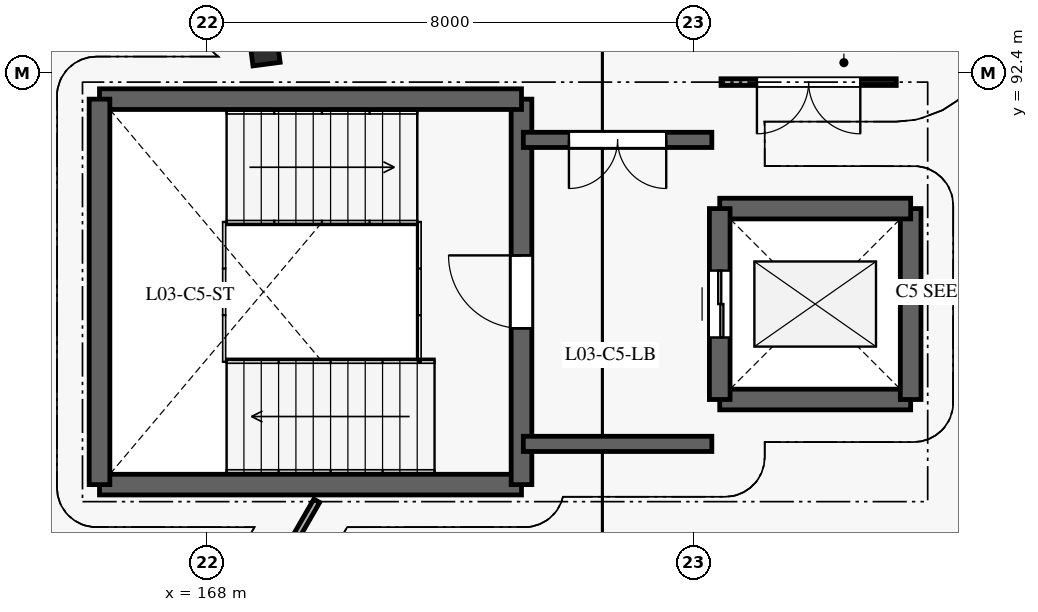
"""IFC4 building model, lengths in metres.
Left out: names, types, materials, properties, quantities, classifications, styles, units other than length and angle.
Written with IfcOpenShell. Run it as: python <this file> out.ifc"""

import sys

from ifc_helpers import new_model, si_unit, direction, frame, frame_2d, origin, origin_2d, place, context, subcontext, project, spatial, rectangle, extrude, element, fill, save


model = new_model("IFC4")
c1 = context("Model", 3, precision=1e-05, world=origin(), true_north=direction((0.0, 1.0)))
c2 = subcontext(c1, "Body", "Model", "MODEL_VIEW")
j1 = project(units=[si_unit("LENGTHUNIT", "METRE"), si_unit("PLANEANGLEUNIT", "RADIAN")], contexts=[c1])
p1 = place(None, origin())
s1 = spatial("IfcSite", under=j1, at=p1, CompositionType="ELEMENT")
p2 = place(p1, origin())
s2 = spatial("IfcBuilding", under=s1, at=p2, CompositionType="ELEMENT")
p3 = place(p2, frame((0.0, 0.0, 12.6)))
s3 = spatial("IfcBuildingStorey", under=s2, at=p3, CompositionType="ELEMENT", Elevation=12.6)
p4 = place(p3, frame((168.948, 92.769, 0.0), z_axis=(0.0, 0.0, 1.0), x_axis=(-0.991444861374, -0.13052619222, 0.0)))
e1 = element("IfcColumn", 1, at=p4, inside=s3, PredefinedType="COLUMN", context=c2, shape_type="SweptSolid", body=[
    extrude(rectangle(XDim=0.45, YDim=0.45, at=origin_2d()), origin(), (0.0, 0.0, 1.0), 4.2),
])
p5 = place(p3, frame((166.23, 85.63, 0.0), z_axis=(0.0, 0.0, 1.0), x_axis=(1.0, 0.0, 0.0)))
e2 = element("IfcWall", 2, at=p5, inside=s3, PredefinedType="SHEAR", context=c2, shape_type="SweptSolid", body=[
    extrude(rectangle(XDim=6.94, YDim=0.34, at=frame_2d((3.47, 0.0))), origin(), (0.0, 0.0, 1.0), 3.95),
])
p6 = place(p3, frame((173.17, 85.63, 0.0), z_axis=(0.0, 0.0, 1.0), x_axis=(0.0, 1.0, 0.0)))
e3 = element("IfcWall", 3, at=p6, inside=s3, PredefinedType="SHEAR", context=c2, shape_type="SweptSolid", body=[
    extrude(rectangle(XDim=6.34, YDim=0.34, at=frame_2d((3.17, 0.0))), origin(), (0.0, 0.0, 1.0), 3.95),
])
p7 = place(p6, frame((2.57, 0.0, 0.0)))
e4 = element("IfcOpeningElement", 4, at=p7, cuts=e3, PredefinedType="OPENING", context=c2, shape_type="SweptSolid", body=[
    extrude(rectangle(XDim=1.2, YDim=2.1, at=frame_2d((0.6, 1.05))), frame((0.0, 0.18, 0.0), z_axis=(0.0, -1.0, 0.0), x_axis=(1.0, 0.0, 0.0)), (0.0, 0.0, 1.0), 0.36),
])
p8 = place(p3, frame((173.17, 91.97, 0.0), z_axis=(0.0, 0.0, 1.0), x_axis=(-1.0, 0.0, 0.0)))
e5 = element("IfcWall", 5, at=p8, inside=s3, PredefinedType="SHEAR", context=c2, shape_type="SweptSolid", body=[
    extrude(rectangle(XDim=6.94, YDim=0.34, at=frame_2d((3.47, 0.0))), origin(), (0.0, 0.0, 1.0), 3.95),
])
p9 = place(p3, frame((166.23, 91.97, 0.0), z_axis=(0.0, 0.0, 1.0), x_axis=(0.0, -1.0, 0.0)))
e6 = element("IfcWall", 6, at=p9, inside=s3, PredefinedType="SHEAR", context=c2, shape_type="SweptSolid", body=[
    extrude(rectangle(XDim=6.34, YDim=0.34, at=frame_2d((3.17, 0.0))), origin(), (0.0, 0.0, 1.0), 3.95),
])
p10 = place(p3, frame((176.43, 87.03, 0.0), z_axis=(0.0, 0.0, 1.0), x_axis=(1.0, 0.0, 0.0)))
e7 = element("IfcWall", 7, at=p10, inside=s3, PredefinedType="SHEAR", context=c2, shape_type="SweptSolid", body=[
    extrude(rectangle(XDim=3.14, YDim=0.34, at=frame_2d((1.57, 0.0))), origin(), (0.0, 0.0, 1.0), 3.95),
])
p11 = place(p3, frame((179.57, 87.03, 0.0), z_axis=(0.0, 0.0, 1.0), x_axis=(0.0, 1.0, 0.0)))
e8 = element("IfcWall", 8, at=p11, inside=s3, PredefinedType="SHEAR", context=c2, shape_type="SweptSolid", body=[
    extrude(rectangle(XDim=3.14, YDim=0.34, at=frame_2d((1.57, 0.0))), origin(), (0.0, 0.0, 1.0), 3.95),
])
p12 = place(p3, frame((179.57, 90.17, 0.0), z_axis=(0.0, 0.0, 1.0), x_axis=(-1.0, 0.0, 0.0)))
e9 = element("IfcWall", 9, at=p12, inside=s3, PredefinedType="SHEAR", context=c2, shape_type="SweptSolid", body=[
    extrude(rectangle(XDim=3.14, YDim=0.34, at=frame_2d((1.57, 0.0))), origin(), (0.0, 0.0, 1.0), 3.95),
])
p13 = place(p3, frame((176.43, 90.17, 0.0), z_axis=(0.0, 0.0, 1.0), x_axis=(0.0, -1.0, 0.0)))
e10 = element("IfcWall", 10, at=p13, inside=s3, PredefinedType="SHEAR", context=c2, shape_type="SweptSolid", body=[
    extrude(rectangle(XDim=3.14, YDim=0.34, at=frame_2d((1.57, 0.0))), origin(), (0.0, 0.0, 1.0), 3.95),
])
p14 = place(p13, frame((1.02, 0.0, 0.0)))
e11 = element("IfcOpeningElement", 11, at=p14, cuts=e10, PredefinedType="OPENING", context=c2, shape_type="SweptSolid", body=[
    extrude(rectangle(XDim=1.1, YDim=2.1, at=frame_2d((0.55, 1.05))), frame((0.0, 0.18, 0.0), z_axis=(0.0, -1.0, 0.0), x_axis=(1.0, 0.0, 0.0)), (0.0, 0.0, 1.0), 0.36),
])
p15 = place(p3, frame((173.2, 86.3, 0.0), z_axis=(0.0, 0.0, 1.0), x_axis=(1.0, 0.0, 0.0)))
e12 = element("IfcWall", 12, at=p15, inside=s3, PredefinedType="SHEAR", context=c2, shape_type="SweptSolid", body=[
    extrude(rectangle(XDim=3.1, YDim=0.25, at=frame_2d((1.55, 0.0))), origin(), (0.0, 0.0, 1.0), 3.95),
])
p16 = place(p3, frame((176.3, 91.3, 0.0), z_axis=(0.0, 0.0, 1.0), x_axis=(-1.0, 0.0, 0.0)))
e13 = element("IfcWall", 13, at=p16, inside=s3, PredefinedType="SHEAR", context=c2, shape_type="SweptSolid", body=[
    extrude(rectangle(XDim=3.1, YDim=0.25, at=frame_2d((1.55, 0.0))), origin(), (0.0, 0.0, 1.0), 3.95),
])
p17 = place(p16, frame((0.75, 0.0, 0.0)))
e14 = element("IfcOpeningElement", 14, at=p17, cuts=e13, PredefinedType="OPENING", context=c2, shape_type="SweptSolid", body=[
    extrude(rectangle(XDim=1.6, YDim=2.15, at=frame_2d((0.8, 1.075))), frame((0.0, 0.135, 0.0), z_axis=(0.0, -1.0, 0.0), x_axis=(1.0, 0.0, 0.0)), (0.0, 0.0, 1.0), 0.27),
])
p18 = place(p3, frame((179.333, 92.25, 0.0), z_axis=(0.0, 0.0, 1.0), x_axis=(-1.0, 0.0, 0.0)))
e15 = element("IfcWall", 15, at=p18, inside=s3, PredefinedType="PARTITIONING", context=c2, shape_type="SweptSolid", body=[
    extrude(rectangle(XDim=2.881, YDim=0.11, at=frame_2d((1.44, 0.0))), origin(), (0.0, 0.0, 1.0), 3.915),
])
p19 = place(p18, frame((0.591, 0.0, 0.0)))
e16 = element("IfcOpeningElement", 16, at=p19, cuts=e15, PredefinedType="OPENING", context=c2, shape_type="SweptSolid", body=[
    extrude(rectangle(XDim=1.7, YDim=2.18, at=frame_2d((0.85, 1.09))), frame((0.0, 0.065, 0.0), z_axis=(0.0, -1.0, 0.0), x_axis=(1.0, 0.0, 0.0)), (0.0, 0.0, 1.0), 0.13),
])
p20 = place(p3, frame((169.803, 85.365, 0.0), z_axis=(0.0, 0.0, 1.0), x_axis=(-0.499990325971, -0.866030989016, 0.0)))
e17 = element("IfcWall", 17, at=p20, inside=s3, PredefinedType="PARTITIONING", context=c2, shape_type="SweptSolid", body=[
    extrude(rectangle(XDim=5.522, YDim=0.11, at=frame_2d((2.761, 0.0))), origin(), (0.0, 0.0, 1.0), 3.915),
])
p21 = place(p7, origin())
e18 = element("IfcDoor", 18, at=p21, inside=s3, OperationType="SINGLE_SWING_RIGHT", PredefinedType="DOOR", context=c2, shape_type="SweptSolid", body=[
    extrude(rectangle(XDim=1.2, YDim=2.1, at=frame_2d((0.6, 1.05))), frame((0.0, 0.025, 0.0), z_axis=(0.0, -1.0, 0.0), x_axis=(1.0, 0.0, 0.0)), (0.0, 0.0, 1.0), 0.05),
])
fill(e4, e18)
p22 = place(p14, frame((1.1, 0.0, 0.0), z_axis=(0.0, 0.0, 1.0), x_axis=(-1.0, 0.0, 0.0)))
e19 = element("IfcDoor", 19, at=p22, inside=s3, OperationType="DOUBLE_DOOR_SLIDING", PredefinedType="DOOR", context=c2, shape_type="SweptSolid", body=[
    extrude(rectangle(XDim=1.1, YDim=2.1, at=frame_2d((0.55, 1.05))), frame((0.0, 0.025, 0.0), z_axis=(0.0, -1.0, 0.0), x_axis=(1.0, 0.0, 0.0)), (0.0, 0.0, 1.0), 0.05),
])
fill(e11, e19)
p23 = place(p17, origin())
e20 = element("IfcDoor", 20, at=p23, inside=s3, OperationType="DOUBLE_DOOR_SINGLE_SWING", PredefinedType="DOOR", context=c2, shape_type="SweptSolid", body=[
    extrude(rectangle(XDim=1.6, YDim=2.15, at=frame_2d((0.8, 1.075))), frame((0.0, 0.025, 0.0), z_axis=(0.0, -1.0, 0.0), x_axis=(1.0, 0.0, 0.0)), (0.0, 0.0, 1.0), 0.05),
])
fill(e14, e20)
p24 = place(p19, origin())
e21 = element("IfcDoor", 21, at=p24, inside=s3, OperationType="DOUBLE_DOOR_SINGLE_SWING", PredefinedType="DOOR", context=c2, shape_type="SweptSolid", body=[
    extrude(rectangle(XDim=1.7, YDim=2.18, at=frame_2d((0.85, 1.09))), frame((0.0, 0.025, 0.0), z_axis=(0.0, -1.0, 0.0), x_axis=(1.0, 0.0, 0.0)), (0.0, 0.0, 1.0), 0.05),
])
fill(e16, e21)
save(model, sys.argv[1])
